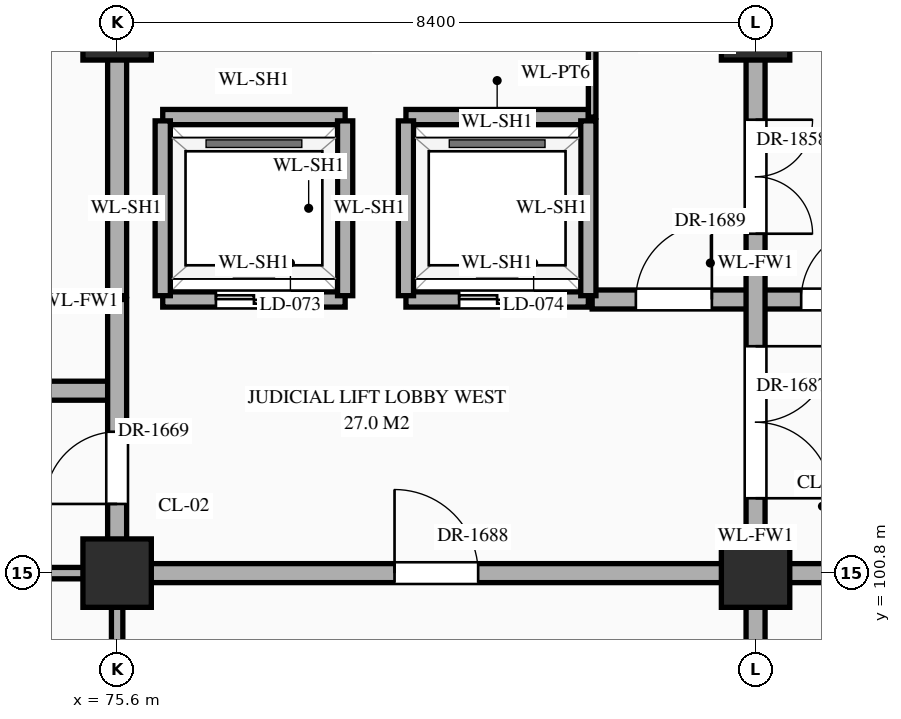
"""IFC4 building model, lengths in metres.
Left out: names, types, materials, properties, quantities, classifications, styles, units other than length and angle.
Written with IfcOpenShell. Run it as: python <this file> out.ifc"""

import sys

from ifc_helpers import new_model, si_unit, direction, frame, frame_2d, origin, origin_2d, place, context, subcontext, project, spatial, rectangle, extrude, element, fill, save


model = new_model("IFC4")
c1 = context("Model", 3, precision=1e-05, world=origin(), true_north=direction((0.0, 1.0)))
c2 = subcontext(c1, "Body", "Model", "MODEL_VIEW")
j1 = project(units=[si_unit("LENGTHUNIT", "METRE"), si_unit("PLANEANGLEUNIT", "RADIAN")], contexts=[c1])
p1 = place(None, origin())
s1 = spatial("IfcSite", under=j1, at=p1, CompositionType="ELEMENT")
p2 = place(p1, origin())
s2 = spatial("IfcBuilding", under=s1, at=p2, CompositionType="ELEMENT")
p3 = place(p2, frame((0.0, 0.0, 16.2)))
s3 = spatial("IfcBuildingStorey", under=s2, at=p3, CompositionType="ELEMENT", Elevation=16.2)
for number, where, z_axis, x_axis in (
    (1, (75.6, 100.8, 0.0), (0.0, 0.0, 1.0), (1.0, 0.0, 0.0)),
    (2, (75.6, 108.0, 0.0), (0.0, 0.0, 1.0), (1.0, 0.0, 0.0)),
    (3, (84.0, 100.8, 0.0), (0.0, 0.0, 1.0), (1.0, 0.0, 0.0)),
    (4, (84.0, 108.0, 0.0), (0.0, 0.0, 1.0), (1.0, 0.0, 0.0)),
):
    element("IfcColumn", number, at=place(p3, frame(where, z_axis=z_axis, x_axis=x_axis)), inside=s3, PredefinedType="COLUMN", context=c2, shape_type="SweptSolid", body=[
        extrude(rectangle(XDim=0.9, YDim=0.9, at=origin_2d()), origin(), (0.0, 0.0, 1.0), 5.4),
    ])
p4 = place(p3, frame((71.4, 100.8, 0.0), z_axis=(0.0, 0.0, 1.0), x_axis=(1.0, 0.0, 0.0)))
e5 = element("IfcWall", 5, at=p4, inside=s3, PredefinedType="STANDARD", context=c2, shape_type="SweptSolid", body=[
    extrude(rectangle(XDim=4.2, YDim=0.15, at=frame_2d((2.1, 0.0))), origin(), (0.0, 0.0, 1.0), 4.27),
])
p5 = place(p4, frame((1.335, 0.0, 0.0)))
e6 = element("IfcOpeningElement", 6, at=p5, cuts=e5, PredefinedType="OPENING", context=c2, shape_type="SweptSolid", body=[
    extrude(rectangle(XDim=1.16, YDim=2.3, at=frame_2d((0.58, 1.15))), frame((0.0, 0.087, 0.0), z_axis=(0.0, -1.0, 0.0), x_axis=(1.0, 0.0, 0.0)), (0.0, 0.0, 1.0), 0.174),
])
p6 = place(p3, frame((75.6, 100.8, 0.0), z_axis=(0.0, 0.0, 1.0), x_axis=(1.0, 0.0, 0.0)))
e7 = element("IfcWall", 7, at=p6, inside=s3, PredefinedType="STANDARD", context=c2, shape_type="SweptSolid", body=[
    extrude(rectangle(XDim=16.8, YDim=0.25, at=frame_2d((8.4, 0.0))), origin(), (0.0, 0.0, 1.0), 4.27),
])
p7 = place(p6, frame((3.65, 0.0, 0.0)))
e8 = element("IfcOpeningElement", 8, at=p7, cuts=e7, PredefinedType="OPENING", context=c2, shape_type="SweptSolid", body=[
    extrude(rectangle(XDim=1.1, YDim=2.2, at=frame_2d((0.55, 1.1))), frame((0.0, 0.137, 0.0), z_axis=(0.0, -1.0, 0.0), x_axis=(1.0, 0.0, 0.0)), (0.0, 0.0, 1.0), 0.274),
])
p8 = place(p6, frame((9.81, 0.0, 0.0)))
e9 = element("IfcOpeningElement", 9, at=p8, cuts=e7, PredefinedType="OPENING", context=c2, shape_type="SweptSolid", body=[
    extrude(rectangle(XDim=0.95, YDim=2.15, at=frame_2d((0.475, 1.075))), frame((0.0, 0.137, 0.0), z_axis=(0.0, -1.0, 0.0), x_axis=(1.0, 0.0, 0.0)), (0.0, 0.0, 1.0), 0.274),
])
p9 = place(p6, frame((12.45, 0.0, 0.0)))
e10 = element("IfcOpeningElement", 10, at=p9, cuts=e7, PredefinedType="OPENING", context=c2, shape_type="SweptSolid", body=[
    extrude(rectangle(XDim=1.1, YDim=2.2, at=frame_2d((0.55, 1.1))), frame((0.0, 0.137, 0.0), z_axis=(0.0, -1.0, 0.0), x_axis=(1.0, 0.0, 0.0)), (0.0, 0.0, 1.0), 0.274),
])
p10 = place(p6, frame((14.815, 0.0, 0.0)))
e11 = element("IfcOpeningElement", 11, at=p10, cuts=e7, PredefinedType="OPENING", context=c2, shape_type="SweptSolid", body=[
    extrude(rectangle(XDim=1.0, YDim=2.2, at=frame_2d((0.5, 1.1))), frame((0.0, 0.137, 0.0), z_axis=(0.0, -1.0, 0.0), x_axis=(1.0, 0.0, 0.0)), (0.0, 0.0, 1.0), 0.274),
])
p11 = place(p3, frame((71.4, 103.2, 0.0), z_axis=(0.0, 0.0, 1.0), x_axis=(1.0, 0.0, 0.0)))
e12 = element("IfcWall", 12, at=p11, inside=s3, PredefinedType="STANDARD", context=c2, shape_type="SweptSolid", body=[
    extrude(rectangle(XDim=4.2, YDim=0.25, at=frame_2d((2.1, 0.0))), origin(), (0.0, 0.0, 1.0), 5.12),
])
p12 = place(p11, frame((1.6, 0.0, 0.0)))
e13 = element("IfcOpeningElement", 13, at=p12, cuts=e12, PredefinedType="OPENING", context=c2, shape_type="SweptSolid", body=[
    extrude(rectangle(XDim=1.0, YDim=2.2, at=frame_2d((0.5, 1.1))), frame((0.0, 0.137, 0.0), z_axis=(0.0, -1.0, 0.0), x_axis=(1.0, 0.0, 0.0)), (0.0, 0.0, 1.0), 0.274),
])
p13 = place(p3, frame((76.2, 104.4, 0.0), z_axis=(0.0, 0.0, 1.0), x_axis=(1.0, 0.0, 0.0)))
e14 = element("IfcWall", 14, at=p13, inside=s3, PredefinedType="STANDARD", context=c2, shape_type="SweptSolid", body=[
    extrude(rectangle(XDim=2.4, YDim=0.2, at=frame_2d((1.2, 0.0))), origin(), (0.0, 0.0, 1.0), 5.12),
])
p14 = place(p13, frame((0.7, 0.0, 0.0)))
e15 = element("IfcOpeningElement", 15, at=p14, cuts=e14, PredefinedType="OPENING", context=c2, shape_type="SweptSolid", body=[
    extrude(rectangle(XDim=1.0, YDim=2.15, at=frame_2d((0.5, 1.075))), frame((0.0, 0.112, 0.0), z_axis=(0.0, -1.0, 0.0), x_axis=(1.0, 0.0, 0.0)), (0.0, 0.0, 1.0), 0.224),
])
p15 = place(p3, frame((79.4, 104.4, 0.0), z_axis=(0.0, 0.0, 1.0), x_axis=(1.0, 0.0, 0.0)))
e16 = element("IfcWall", 16, at=p15, inside=s3, PredefinedType="STANDARD", context=c2, shape_type="SweptSolid", body=[
    extrude(rectangle(XDim=2.4, YDim=0.2, at=frame_2d((1.2, 0.0))), origin(), (0.0, 0.0, 1.0), 5.12),
])
p16 = place(p15, frame((0.7, 0.0, 0.0)))
e17 = element("IfcOpeningElement", 17, at=p16, cuts=e16, PredefinedType="OPENING", context=c2, shape_type="SweptSolid", body=[
    extrude(rectangle(XDim=1.0, YDim=2.15, at=frame_2d((0.5, 1.075))), frame((0.0, 0.112, 0.0), z_axis=(0.0, -1.0, 0.0), x_axis=(1.0, 0.0, 0.0)), (0.0, 0.0, 1.0), 0.224),
])
p17 = place(p3, frame((81.85, 104.4, 0.0), z_axis=(0.0, 0.0, 1.0), x_axis=(1.0, 0.0, 0.0)))
e18 = element("IfcWall", 18, at=p17, inside=s3, PredefinedType="STANDARD", context=c2, shape_type="SweptSolid", body=[
    extrude(rectangle(XDim=4.3, YDim=0.25, at=frame_2d((2.15, 0.0))), origin(), (0.0, 0.0, 1.0), 5.12),
])
p18 = place(p17, frame((0.575, 0.0, 0.0)))
e19 = element("IfcOpeningElement", 19, at=p18, cuts=e18, PredefinedType="OPENING", context=c2, shape_type="SweptSolid", body=[
    extrude(rectangle(XDim=1.0, YDim=2.2, at=frame_2d((0.5, 1.1))), frame((0.0, 0.137, 0.0), z_axis=(0.0, -1.0, 0.0), x_axis=(1.0, 0.0, 0.0)), (0.0, 0.0, 1.0), 0.274),
])
p19 = place(p17, frame((2.75, 0.0, 0.0)))
e20 = element("IfcOpeningElement", 20, at=p19, cuts=e18, PredefinedType="OPENING", context=c2, shape_type="SweptSolid", body=[
    extrude(rectangle(XDim=0.95, YDim=2.15, at=frame_2d((0.475, 1.075))), frame((0.0, 0.137, 0.0), z_axis=(0.0, -1.0, 0.0), x_axis=(1.0, 0.0, 0.0)), (0.0, 0.0, 1.0), 0.274),
])
for number, where, z_axis, x_axis in (
    (21, (76.2, 106.8, 0.0), (0.0, 0.0, 1.0), (1.0, 0.0, 0.0)),
    (22, (79.4, 106.8, 0.0), (0.0, 0.0, 1.0), (1.0, 0.0, 0.0)),
):
    element("IfcWall", number, at=place(p3, frame(where, z_axis=z_axis, x_axis=x_axis)), inside=s3, PredefinedType="STANDARD", context=c2, shape_type="SweptSolid", body=[
        extrude(rectangle(XDim=2.4, YDim=0.2, at=frame_2d((1.2, 0.0))), origin(), (0.0, 0.0, 1.0), 5.12),
    ])
p20 = place(p3, frame((75.6, 96.0, 0.0), z_axis=(0.0, 0.0, 1.0), x_axis=(0.0, 1.0, 0.0)))
e23 = element("IfcWall", 23, at=p20, inside=s3, PredefinedType="STANDARD", context=c2, shape_type="SweptSolid", body=[
    extrude(rectangle(XDim=4.8, YDim=0.15, at=frame_2d((2.4, 0.0))), origin(), (0.0, 0.0, 1.0), 4.37),
])
p21 = place(p3, frame((75.6, 100.8, 0.0), z_axis=(0.0, 0.0, 1.0), x_axis=(0.0, 1.0, 0.0)))
e24 = element("IfcWall", 24, at=p21, inside=s3, PredefinedType="STANDARD", context=c2, shape_type="SweptSolid", body=[
    extrude(rectangle(XDim=3.6, YDim=0.25, at=frame_2d((1.8, 0.0))), origin(), (0.0, 0.0, 1.0), 4.37),
])
p22 = place(p21, frame((0.91, 0.0, 0.0)))
e25 = element("IfcOpeningElement", 25, at=p22, cuts=e24, PredefinedType="OPENING", context=c2, shape_type="SweptSolid", body=[
    extrude(rectangle(XDim=0.95, YDim=2.15, at=frame_2d((0.475, 1.075))), frame((0.0, 0.137, 0.0), z_axis=(0.0, -1.0, 0.0), x_axis=(1.0, 0.0, 0.0)), (0.0, 0.0, 1.0), 0.274),
])
p23 = place(p3, frame((75.6, 104.45, 0.0), z_axis=(0.0, 0.0, 1.0), x_axis=(0.0, 1.0, 0.0)))
e26 = element("IfcWall", 26, at=p23, inside=s3, PredefinedType="STANDARD", context=c2, shape_type="SweptSolid", body=[
    extrude(rectangle(XDim=3.5, YDim=0.25, at=frame_2d((1.75, 0.0))), origin(), (0.0, 0.0, 1.0), 4.37),
])
for number, where, z_axis, x_axis in (
    (27, (76.2, 104.45, 0.0), (0.0, 0.0, 1.0), (0.0, 1.0, 0.0)),
    (28, (78.6, 104.45, 0.0), (0.0, 0.0, 1.0), (0.0, 1.0, 0.0)),
    (29, (79.4, 104.45, 0.0), (0.0, 0.0, 1.0), (0.0, 1.0, 0.0)),
    (30, (81.8, 104.45, 0.0), (0.0, 0.0, 1.0), (0.0, 1.0, 0.0)),
):
    element("IfcWall", number, at=place(p3, frame(where, z_axis=z_axis, x_axis=x_axis)), inside=s3, PredefinedType="STANDARD", context=c2, shape_type="SweptSolid", body=[
        extrude(rectangle(XDim=2.3, YDim=0.2, at=frame_2d((1.15, 0.0))), origin(), (0.0, 0.0, 1.0), 5.12),
    ])
p24 = place(p3, frame((81.85, 106.8, 0.0), z_axis=(0.0, 0.0, 1.0), x_axis=(0.0, 1.0, 0.0)))
e31 = element("IfcWall", 31, at=p24, inside=s3, PredefinedType="STANDARD", context=c2, shape_type="SweptSolid", body=[
    extrude(rectangle(XDim=1.15, YDim=0.1, at=frame_2d((0.575, 0.0))), origin(), (0.0, 0.0, 1.0), 5.12),
])
p25 = place(p3, frame((84.0, 79.2, 0.0), z_axis=(0.0, 0.0, 1.0), x_axis=(0.0, 1.0, 0.0)))
e32 = element("IfcWall", 32, at=p25, inside=s3, PredefinedType="STANDARD", context=c2, shape_type="SweptSolid", body=[
    extrude(rectangle(XDim=35.96, YDim=0.25, at=frame_2d((17.98, 0.0))), origin(), (0.0, 0.0, 1.0), 4.37),
])
p26 = place(p25, frame((22.585, 0.0, 0.0)))
e33 = element("IfcOpeningElement", 33, at=p26, cuts=e32, PredefinedType="OPENING", context=c2, shape_type="SweptSolid", body=[
    extrude(rectangle(XDim=2.0, YDim=2.4, at=frame_2d((1.0, 1.2))), frame((0.0, 0.137, 0.0), z_axis=(0.0, -1.0, 0.0), x_axis=(1.0, 0.0, 0.0)), (0.0, 0.0, 1.0), 0.274),
])
p27 = place(p25, frame((12.465, 0.0, 0.0)))
e34 = element("IfcOpeningElement", 34, at=p27, cuts=e32, PredefinedType="OPENING", context=c2, shape_type="SweptSolid", body=[
    extrude(rectangle(XDim=1.1, YDim=2.2, at=frame_2d((0.55, 1.1))), frame((0.0, 0.137, 0.0), z_axis=(0.0, -1.0, 0.0), x_axis=(1.0, 0.0, 0.0)), (0.0, 0.0, 1.0), 0.274),
])
p28 = place(p25, frame((15.31, 0.0, 0.0)))
e35 = element("IfcOpeningElement", 35, at=p28, cuts=e32, PredefinedType="OPENING", context=c2, shape_type="SweptSolid", body=[
    extrude(rectangle(XDim=0.95, YDim=2.15, at=frame_2d((0.475, 1.075))), frame((0.0, 0.137, 0.0), z_axis=(0.0, -1.0, 0.0), x_axis=(1.0, 0.0, 0.0)), (0.0, 0.0, 1.0), 0.274),
])
p29 = place(p25, frame((26.065, 0.0, 0.0)))
e36 = element("IfcOpeningElement", 36, at=p29, cuts=e32, PredefinedType="OPENING", context=c2, shape_type="SweptSolid", body=[
    extrude(rectangle(XDim=1.5, YDim=2.25, at=frame_2d((0.75, 1.125))), frame((0.0, 0.137, 0.0), z_axis=(0.0, -1.0, 0.0), x_axis=(1.0, 0.0, 0.0)), (0.0, 0.0, 1.0), 0.274),
])
p30 = place(p25, frame((29.71, 0.0, 0.0)))
e37 = element("IfcOpeningElement", 37, at=p30, cuts=e32, PredefinedType="OPENING", context=c2, shape_type="SweptSolid", body=[
    extrude(rectangle(XDim=0.95, YDim=2.15, at=frame_2d((0.475, 1.075))), frame((0.0, 0.137, 0.0), z_axis=(0.0, -1.0, 0.0), x_axis=(1.0, 0.0, 0.0)), (0.0, 0.0, 1.0), 0.274),
])
p31 = place(p25, frame((5.315, 0.0, 0.0)))
e38 = element("IfcOpeningElement", 38, at=p31, cuts=e32, PredefinedType="OPENING", context=c2, shape_type="SweptSolid", body=[
    extrude(rectangle(XDim=1.0, YDim=2.2, at=frame_2d((0.5, 1.1))), frame((0.0, 0.137, 0.0), z_axis=(0.0, -1.0, 0.0), x_axis=(1.0, 0.0, 0.0)), (0.0, 0.0, 1.0), 0.274),
])
p32 = place(p14, origin())
e39 = element("IfcDoor", 39, at=p32, inside=s3, OperationType="DOUBLE_DOOR_SLIDING", PredefinedType="DOOR", context=c2, shape_type="SweptSolid", body=[
    extrude(rectangle(XDim=1.0, YDim=2.15, at=frame_2d((0.5, 1.075))), frame((0.0, 0.025, 0.0), z_axis=(0.0, -1.0, 0.0), x_axis=(1.0, 0.0, 0.0)), (0.0, 0.0, 1.0), 0.05),
])
fill(e15, e39)
p33 = place(p16, origin())
e40 = element("IfcDoor", 40, at=p33, inside=s3, OperationType="DOUBLE_DOOR_SLIDING", PredefinedType="DOOR", context=c2, shape_type="SweptSolid", body=[
    extrude(rectangle(XDim=1.0, YDim=2.15, at=frame_2d((0.5, 1.075))), frame((0.0, 0.025, 0.0), z_axis=(0.0, -1.0, 0.0), x_axis=(1.0, 0.0, 0.0)), (0.0, 0.0, 1.0), 0.05),
])
fill(e17, e40)
p34 = place(p22, origin())
e41 = element("IfcDoor", 41, at=p34, inside=s3, OperationType="SINGLE_SWING_LEFT", PredefinedType="DOOR", context=c2, shape_type="SweptSolid", body=[
    extrude(rectangle(XDim=0.95, YDim=2.15, at=frame_2d((0.475, 1.075))), frame((0.0, 0.025, 0.0), z_axis=(0.0, -1.0, 0.0), x_axis=(1.0, 0.0, 0.0)), (0.0, 0.0, 1.0), 0.05),
])
fill(e25, e41)
p35 = place(p26, frame((2.0, 0.0, 0.0), z_axis=(0.0, 0.0, 1.0), x_axis=(-1.0, 0.0, 0.0)))
e42 = element("IfcDoor", 42, at=p35, inside=s3, OperationType="DOUBLE_DOOR_SINGLE_SWING", PredefinedType="DOOR", context=c2, shape_type="SweptSolid", body=[
    extrude(rectangle(XDim=2.0, YDim=2.4, at=frame_2d((1.0, 1.2))), frame((0.0, 0.025, 0.0), z_axis=(0.0, -1.0, 0.0), x_axis=(1.0, 0.0, 0.0)), (0.0, 0.0, 1.0), 0.05),
])
fill(e33, e42)
p36 = place(p7, origin())
e43 = element("IfcDoor", 43, at=p36, inside=s3, OperationType="SINGLE_SWING_LEFT", PredefinedType="DOOR", context=c2, shape_type="SweptSolid", body=[
    extrude(rectangle(XDim=1.1, YDim=2.2, at=frame_2d((0.55, 1.1))), frame((0.0, 0.025, 0.0), z_axis=(0.0, -1.0, 0.0), x_axis=(1.0, 0.0, 0.0)), (0.0, 0.0, 1.0), 0.05),
])
fill(e8, e43)
p37 = place(p18, origin())
e44 = element("IfcDoor", 44, at=p37, inside=s3, OperationType="SINGLE_SWING_RIGHT", PredefinedType="DOOR", context=c2, shape_type="SweptSolid", body=[
    extrude(rectangle(XDim=1.0, YDim=2.2, at=frame_2d((0.5, 1.1))), frame((0.0, 0.025, 0.0), z_axis=(0.0, -1.0, 0.0), x_axis=(1.0, 0.0, 0.0)), (0.0, 0.0, 1.0), 0.05),
])
fill(e19, e44)
p38 = place(p19, origin())
e45 = element("IfcDoor", 45, at=p38, inside=s3, OperationType="SINGLE_SWING_RIGHT", PredefinedType="DOOR", context=c2, shape_type="SweptSolid", body=[
    extrude(rectangle(XDim=0.95, YDim=2.15, at=frame_2d((0.475, 1.075))), frame((0.0, 0.025, 0.0), z_axis=(0.0, -1.0, 0.0), x_axis=(1.0, 0.0, 0.0)), (0.0, 0.0, 1.0), 0.05),
])
fill(e20, e45)
p39 = place(p29, frame((1.5, 0.0, 0.0), z_axis=(0.0, 0.0, 1.0), x_axis=(-1.0, 0.0, 0.0)))
e46 = element("IfcDoor", 46, at=p39, inside=s3, OperationType="DOUBLE_DOOR_SINGLE_SWING", PredefinedType="DOOR", context=c2, shape_type="SweptSolid", body=[
    extrude(rectangle(XDim=1.5, YDim=2.25, at=frame_2d((0.75, 1.125))), frame((0.0, 0.025, 0.0), z_axis=(0.0, -1.0, 0.0), x_axis=(1.0, 0.0, 0.0)), (0.0, 0.0, 1.0), 0.05),
])
fill(e36, e46)
save(model, sys.argv[1])
